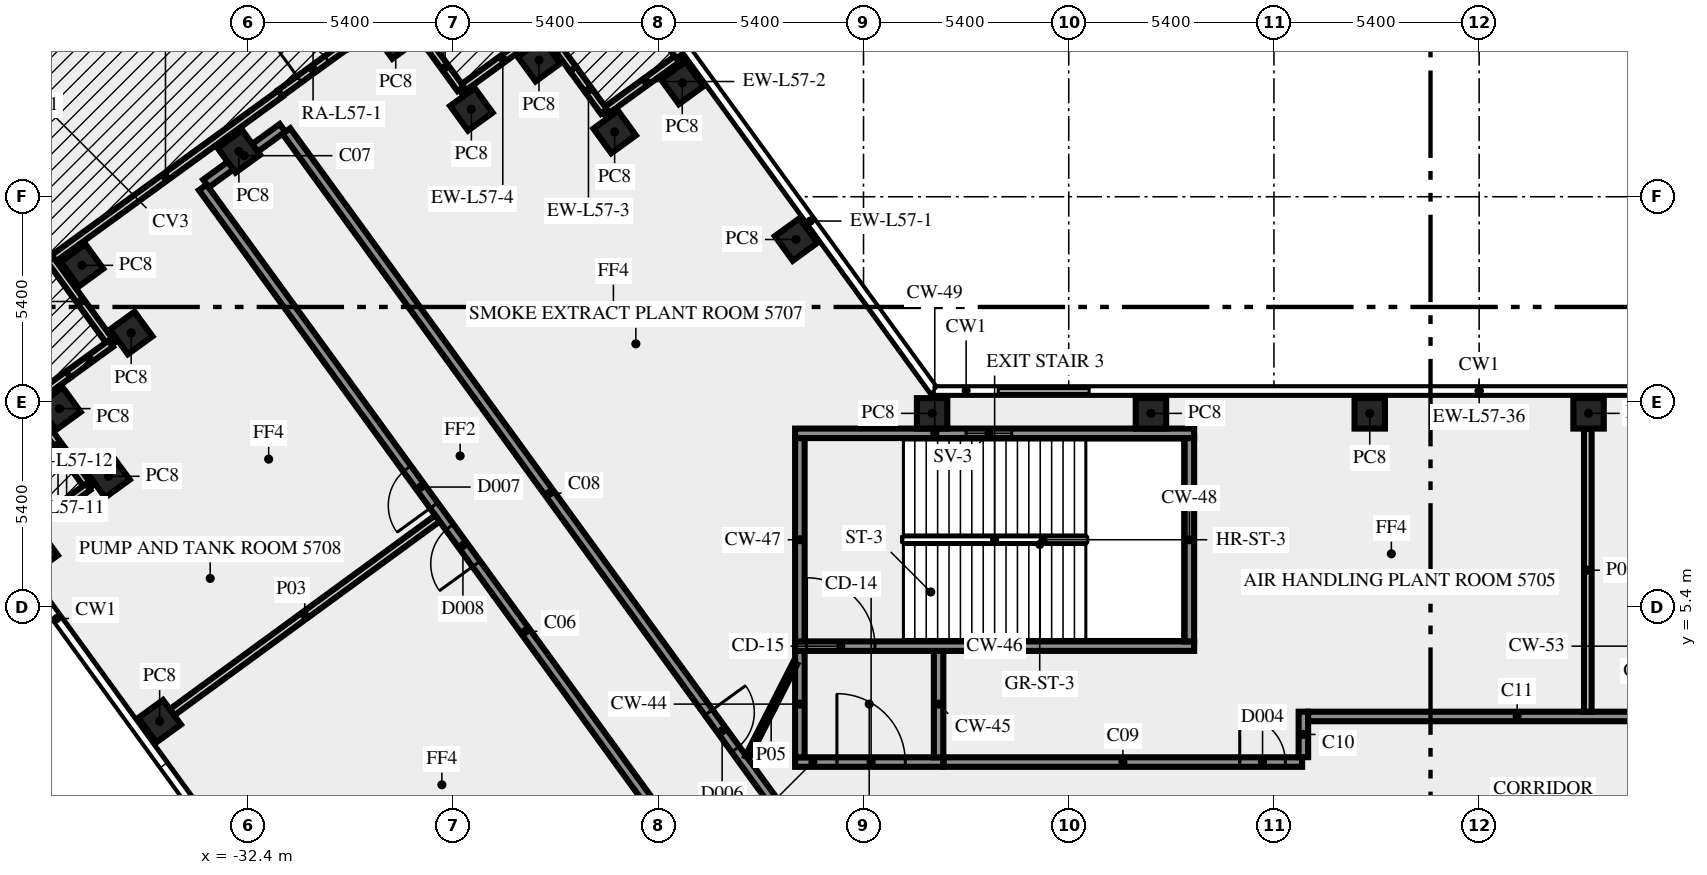
"""IFC4 building model, lengths in metres.
Left out: names, types, materials, properties, quantities, classifications, styles, units other than length and angle.
Written with IfcOpenShell. Run it as: python <this file> out.ifc"""

import sys

from ifc_helpers import new_model, si_unit, direction, frame, frame_2d, origin, origin_2d, place, context, subcontext, project, spatial, rectangle, extrude, element, fill, save


model = new_model("IFC4")
c1 = context("Model", 3, precision=1e-05, world=origin(), true_north=direction((0.0, 1.0)))
c2 = subcontext(c1, "Body", "Model", "MODEL_VIEW")
j1 = project(units=[si_unit("LENGTHUNIT", "METRE"), si_unit("PLANEANGLEUNIT", "RADIAN")], contexts=[c1])
p1 = place(None, origin())
s1 = spatial("IfcSite", under=j1, at=p1, CompositionType="ELEMENT")
p2 = place(p1, origin())
s2 = spatial("IfcBuilding", under=s1, at=p2, CompositionType="ELEMENT")
p3 = place(p2, frame((0.0, 0.0, 242.0)))
s3 = spatial("IfcBuildingStorey", under=s2, at=p3, CompositionType="ELEMENT", Elevation=242.0)
for number, where, z_axis, x_axis in (
    (1, (-17.974, 15.075, 0.0), (0.0, 0.0, 1.0), (-0.588, 0.809, 0.0)),
    (2, (-20.97, 19.195, 0.0), (0.0, 0.0, 1.0), (-0.588, 0.809, 0.0)),
    (3, (-22.749, 17.904, 0.0), (0.0, 0.0, 1.0), (-0.588, 0.809, 0.0)),
    (4, (-24.74, 19.795, 0.0), (0.0, 0.0, 1.0), (-0.588, 0.809, 0.0)),
    (5, (-26.519, 18.5, 0.0), (0.0, 0.0, 1.0), (-0.588, 0.809, 0.0)),
    (6, (-28.51, 20.39, 0.0), (0.0, 0.0, 1.0), (-0.809, -0.588, 0.0)),
    (7, (-32.637, 17.393, 0.0), (0.0, 0.0, 1.0), (-0.809, -0.588, 0.0)),
    (8, (-36.765, 14.395, 0.0), (0.0, 0.0, 1.0), (0.588, -0.809, 0.0)),
    (9, (-35.471, 12.616, 0.0), (0.0, 0.0, 1.0), (-0.809, -0.588, 0.0)),
    (10, (-37.36, 10.625, 0.0), (0.0, 0.0, 1.0), (0.588, -0.809, 0.0)),
    (11, (-36.068, 8.844, 0.0), (0.0, 0.0, 1.0), (0.588, -0.809, 0.0)),
    (12, (-37.96, 6.855, 0.0), (0.0, 0.0, 1.0), (0.588, -0.809, 0.0)),
    (13, (-34.722, 2.4, 0.0), (0.0, 0.0, 1.0), (0.588, -0.809, 0.0)),
    (14, (2.879, 10.5, 0.0), (0.0, 0.0, 1.0), (-1.0, 0.0, 0.0)),
    (15, (-2.879, 10.5, 0.0), (0.0, 0.0, 1.0), (-1.0, 0.0, 0.0)),
    (16, (-8.637, 10.5, 0.0), (0.0, 0.0, 1.0), (-1.0, 0.0, 0.0)),
    (17, (-14.395, 10.5, 0.0), (0.0, 0.0, 1.0), (-1.0, 0.0, 0.0)),
):
    element("IfcColumn", number, at=place(p3, frame(where, z_axis=z_axis, x_axis=x_axis)), inside=s3, PredefinedType="COLUMN", context=c2, shape_type="SweptSolid", body=[
        extrude(rectangle(XDim=0.8, YDim=0.8, at=origin_2d()), origin(), (0.0, 0.0, 1.0), 5.6),
    ])
p4 = place(p3, frame((-14.354, 11.093, 0.0), z_axis=(0.0, 0.0, 1.0), x_axis=(-0.58779571445, 0.809009393069, 0.0)))
e18 = element("IfcWall", 18, at=p4, inside=s3, PredefinedType="SOLIDWALL", context=c2, shape_type="SweptSolid", body=[
    extrude(rectangle(XDim=11.044, YDim=0.2, at=frame_2d((5.522, 0.0))), origin(), (0.0, 0.0, 1.0), 5.6),
])
p5 = place(p3, frame((-20.829, 20.025, 0.0), z_axis=(0.0, 0.0, 1.0), x_axis=(-0.808990163075, -0.587822180636, 0.0)))
e19 = element("IfcWall", 19, at=p5, inside=s3, PredefinedType="SOLIDWALL", context=c2, shape_type="SweptSolid", body=[
    extrude(rectangle(XDim=2.7, YDim=0.2, at=frame_2d((1.35, 0.0))), origin(), (0.0, 0.0, 1.0), 5.6),
])
p6 = place(p3, frame((-23.03, 18.441, 0.0), z_axis=(0.0, 0.0, 1.0), x_axis=(-0.587753586678, 0.809039999844, 0.0)))
e20 = element("IfcWall", 20, at=p6, inside=s3, PredefinedType="SOLIDWALL", context=c2, shape_type="SweptSolid", body=[
    extrude(rectangle(XDim=1.389, YDim=0.2, at=frame_2d((0.694, 0.0))), origin(), (0.0, 0.0, 1.0), 4.1),
])
p7 = place(p3, frame((-23.846, 19.565, 0.0), z_axis=(0.0, 0.0, 1.0), x_axis=(-0.587772972264, 0.809025916196, 0.0)))
e21 = element("IfcWall", 21, at=p7, inside=s3, PredefinedType="SOLIDWALL", context=c2, shape_type="SweptSolid", body=[
    extrude(rectangle(XDim=1.311, YDim=0.2, at=frame_2d((0.655, 0.0))), origin(), (0.0, 0.0, 1.0), 5.6),
])
p8 = place(p3, frame((-24.6, 20.623, 0.0), z_axis=(0.0, 0.0, 1.0), x_axis=(-0.809064397168, -0.587720002413, 0.0)))
e22 = element("IfcWall", 22, at=p8, inside=s3, PredefinedType="SOLIDWALL", context=c2, shape_type="SweptSolid", body=[
    extrude(rectangle(XDim=2.7, YDim=0.2, at=frame_2d((1.35, 0.0))), origin(), (0.0, 0.0, 1.0), 5.6),
])
p9 = place(p3, frame((-26.802, 19.038, 0.0), z_axis=(0.0, 0.0, 1.0), x_axis=(-0.587731903943, 0.809055751533, 0.0)))
e23 = element("IfcWall", 23, at=p9, inside=s3, PredefinedType="SOLIDWALL", context=c2, shape_type="SweptSolid", body=[
    extrude(rectangle(XDim=1.386, YDim=0.2, at=frame_2d((0.693, 0.0))), origin(), (0.0, 0.0, 1.0), 4.1),
])
p10 = place(p3, frame((-31.549, 18.926, 0.0), z_axis=(0.0, 0.0, 1.0), x_axis=(0.809022465264, 0.587777722186, 0.0)))
e24 = element("IfcWall", 24, at=p10, inside=s3, PredefinedType="SOLIDWALL", context=c2, shape_type="SweptSolid", body=[
    extrude(rectangle(XDim=2.137, YDim=0.2, at=frame_2d((1.069, 0.0))), origin(), (0.0, 0.0, 1.0), 5.6),
])
p11 = place(p10, frame((0.619, 0.0, 0.0)))
e25 = element("IfcOpeningElement", 25, at=p11, cuts=e24, PredefinedType="OPENING", context=c2, shape_type="SweptSolid", body=[
    extrude(rectangle(XDim=0.9, YDim=2.1, at=frame_2d((0.45, 1.05))), frame((0.0, 0.11, 0.0), z_axis=(0.0, -1.0, 0.0), x_axis=(1.0, 0.0, 0.0)), (0.0, 0.0, 1.0), 0.22),
])
p12 = place(p3, frame((-31.542, 18.917, 0.0), z_axis=(0.0, 0.0, 1.0), x_axis=(-0.809028102457, -0.587769963025, 0.0)))
e26 = element("IfcWall", 26, at=p12, inside=s3, PredefinedType="SOLIDWALL", context=c2, shape_type="SweptSolid", body=[
    extrude(rectangle(XDim=7.481, YDim=0.2, at=frame_2d((3.741, 0.0))), origin(), (0.0, 0.0, 1.0), 5.6),
])
p13 = place(p3, frame((-37.592, 14.536, 0.0), z_axis=(0.0, 0.0, 1.0), x_axis=(0.587762999008, -0.809033161865, 0.0)))
e27 = element("IfcWall", 27, at=p13, inside=s3, PredefinedType="SOLIDWALL", context=c2, shape_type="SweptSolid", body=[
    extrude(rectangle(XDim=2.7, YDim=0.2, at=frame_2d((1.35, 0.0))), origin(), (0.0, 0.0, 1.0), 5.6),
])
p14 = place(p3, frame((-36.007, 12.335, 0.0), z_axis=(0.0, 0.0, 1.0), x_axis=(-0.809078659976, -0.58770036751, 0.0)))
e28 = element("IfcWall", 28, at=p14, inside=s3, PredefinedType="SOLIDWALL", context=c2, shape_type="SweptSolid", body=[
    extrude(rectangle(XDim=1.386, YDim=0.2, at=frame_2d((0.693, 0.0))), origin(), (0.0, 0.0, 1.0), 4.1),
])
p15 = place(p3, frame((-37.129, 11.52, 0.0), z_axis=(0.0, 0.0, 1.0), x_axis=(-0.808985145084, -0.587829086584, 0.0)))
e29 = element("IfcWall", 29, at=p15, inside=s3, PredefinedType="SOLIDWALL", context=c2, shape_type="SweptSolid", body=[
    extrude(rectangle(XDim=1.314, YDim=0.2, at=frame_2d((0.657, 0.0))), origin(), (0.0, 0.0, 1.0), 5.6),
])
p16 = place(p3, frame((-38.189, 10.765, 0.0), z_axis=(0.0, 0.0, 1.0), x_axis=(0.587822180636, -0.808990163075, 0.0)))
e30 = element("IfcWall", 30, at=p16, inside=s3, PredefinedType="SOLIDWALL", context=c2, shape_type="SweptSolid", body=[
    extrude(rectangle(XDim=2.7, YDim=0.2, at=frame_2d((1.35, 0.0))), origin(), (0.0, 0.0, 1.0), 5.6),
])
p17 = place(p3, frame((-36.605, 8.563, 0.0), z_axis=(0.0, 0.0, 1.0), x_axis=(-0.808970345434, -0.587849453694, 0.0)))
e31 = element("IfcWall", 31, at=p17, inside=s3, PredefinedType="SOLIDWALL", context=c2, shape_type="SweptSolid", body=[
    extrude(rectangle(XDim=1.397, YDim=0.2, at=frame_2d((0.698, 0.0))), origin(), (0.0, 0.0, 1.0), 4.1),
])
p18 = place(p3, frame((-38.786, 6.993, 0.0), z_axis=(0.0, 0.0, 1.0), x_axis=(0.587789790223, -0.809013697356, 0.0)))
e32 = element("IfcWall", 32, at=p18, inside=s3, PredefinedType="SOLIDWALL", context=c2, shape_type="SweptSolid", body=[
    extrude(rectangle(XDim=16.956, YDim=0.2, at=frame_2d((8.478, 0.0))), origin(), (0.0, 0.0, 1.0), 5.6),
])
p19 = place(p3, frame((14.344, 11.088, 0.0), z_axis=(0.0, 0.0, 1.0), x_axis=(-1.0, 0.0, 0.0)))
e33 = element("IfcWall", 33, at=p19, inside=s3, PredefinedType="SOLIDWALL", context=c2, shape_type="SweptSolid", body=[
    extrude(rectangle(XDim=28.688, YDim=0.2, at=frame_2d((14.344, 0.0))), origin(), (0.0, 0.0, 1.0), 5.6),
])
p20 = place(p3, frame((-27.939, 29.429, 0.0), z_axis=(0.0, 0.0, 1.0), x_axis=(0.587780660559, -0.809020330444, 0.0)))
e34 = element("IfcWall", 34, at=p20, inside=s3, PredefinedType="PARAPET", context=c2, shape_type="SweptSolid", body=[
    extrude(rectangle(XDim=11.77, YDim=0.25, at=frame_2d((5.885, 0.0))), origin(), (0.0, 0.0, 1.0), 1.1),
])
p21 = place(p3, frame((-18.0, 1.325, 0.0), z_axis=(0.0, 0.0, 1.0), x_axis=(1.0, 0.0, 0.0)))
e35 = element("IfcWall", 35, at=p21, inside=s3, PredefinedType="SHEAR", context=c2, shape_type="SweptSolid", body=[
    extrude(rectangle(XDim=3.9, YDim=0.25, at=frame_2d((1.95, 0.0))), origin(), (0.0, 0.0, 1.0), 5.6),
])
p22 = place(p21, frame((1.1, 0.0, 0.0)))
e36 = element("IfcOpeningElement", 36, at=p22, cuts=e35, PredefinedType="OPENING", context=c2, shape_type="SweptSolid", body=[
    extrude(rectangle(XDim=1.8, YDim=2.1, at=frame_2d((0.9, 1.05))), frame((0.0, 0.135, 0.0), z_axis=(0.0, -1.0, 0.0), x_axis=(1.0, 0.0, 0.0)), (0.0, 0.0, 1.0), 0.27),
])
for number, where, z_axis, x_axis in (
    (37, (-17.875, 1.45, 0.0), (0.0, 0.0, 1.0), (0.0, 1.0, 0.0)),
    (38, (-14.225, 1.45, 0.0), (0.0, 0.0, 1.0), (0.0, 1.0, 0.0)),
):
    element("IfcWall", number, at=place(p3, frame(where, z_axis=z_axis, x_axis=x_axis)), inside=s3, PredefinedType="SHEAR", context=c2, shape_type="SweptSolid", body=[
        extrude(rectangle(XDim=2.8, YDim=0.25, at=frame_2d((1.4, 0.0))), origin(), (0.0, 0.0, 1.0), 5.6),
    ])
p23 = place(p3, frame((-18.0, 4.375, 0.0), z_axis=(0.0, 0.0, 1.0), x_axis=(1.0, 0.0, 0.0)))
e39 = element("IfcWall", 39, at=p23, inside=s3, PredefinedType="SHEAR", context=c2, shape_type="SweptSolid", body=[
    extrude(rectangle(XDim=10.5, YDim=0.25, at=frame_2d((5.25, 0.0))), origin(), (0.0, 0.0, 1.0), 5.6),
])
p24 = place(p23, frame((0.3, 0.0, 0.0)))
e40 = element("IfcOpeningElement", 40, at=p24, cuts=e39, PredefinedType="OPENING", context=c2, shape_type="SweptSolid", body=[
    extrude(rectangle(XDim=1.8, YDim=2.1, at=frame_2d((0.9, 1.05))), frame((0.0, 0.135, 0.0), z_axis=(0.0, -1.0, 0.0), x_axis=(1.0, 0.0, 0.0)), (0.0, 0.0, 1.0), 0.27),
])
for number, where, z_axis, x_axis in (
    (41, (-17.875, 4.5, 0.0), (0.0, 0.0, 1.0), (0.0, 1.0, 0.0)),
    (42, (-7.625, 4.5, 0.0), (0.0, 0.0, 1.0), (0.0, 1.0, 0.0)),
):
    element("IfcWall", number, at=place(p3, frame(where, z_axis=z_axis, x_axis=x_axis)), inside=s3, PredefinedType="SHEAR", context=c2, shape_type="SweptSolid", body=[
        extrude(rectangle(XDim=5.35, YDim=0.25, at=frame_2d((2.675, 0.0))), origin(), (0.0, 0.0, 1.0), 5.6),
    ])
p25 = place(p3, frame((-18.0, 9.975, 0.0), z_axis=(0.0, 0.0, 1.0), x_axis=(1.0, 0.0, 0.0)))
e43 = element("IfcWall", 43, at=p25, inside=s3, PredefinedType="SHEAR", context=c2, shape_type="SweptSolid", body=[
    extrude(rectangle(XDim=10.5, YDim=0.25, at=frame_2d((5.25, 0.0))), origin(), (0.0, 0.0, 1.0), 5.6),
])
p26 = place(p25, frame((4.5, 0.0, 1.0)))
e44 = element("IfcOpeningElement", 44, at=p26, cuts=e43, PredefinedType="OPENING", context=c2, shape_type="SweptSolid", body=[
    extrude(rectangle(XDim=1.2, YDim=1.2, at=frame_2d((0.6, 0.6))), frame((0.0, 0.135, 0.0), z_axis=(0.0, -1.0, 0.0), x_axis=(1.0, 0.0, 0.0)), (0.0, 0.0, 1.0), 0.27),
])
p27 = place(p3, frame((-20.531, -1.523, 0.0), z_axis=(0.0, 0.0, 1.0), x_axis=(-0.587782114023, 0.809019274452, 0.0)))
e45 = element("IfcWall", 45, at=p27, inside=s3, PredefinedType="SOLIDWALL", context=c2, shape_type="SweptSolid", body=[
    extrude(rectangle(XDim=22.212, YDim=0.25, at=frame_2d((11.106, 0.0))), origin(), (0.0, 0.0, 1.0), 5.6),
])
p28 = place(p27, frame((11.865, 0.0, 0.0)))
e46 = element("IfcOpeningElement", 46, at=p28, cuts=e45, PredefinedType="OPENING", context=c2, shape_type="SweptSolid", body=[
    extrude(rectangle(XDim=1.2, YDim=2.1, at=frame_2d((0.6, 1.05))), frame((0.0, 0.135, 0.0), z_axis=(0.0, -1.0, 0.0), x_axis=(1.0, 0.0, 0.0)), (0.0, 0.0, 1.0), 0.27),
])
p29 = place(p27, frame((9.966, 0.0, 0.0)))
e47 = element("IfcOpeningElement", 47, at=p29, cuts=e45, PredefinedType="OPENING", context=c2, shape_type="SweptSolid", body=[
    extrude(rectangle(XDim=1.2, YDim=2.1, at=frame_2d((0.6, 1.05))), frame((0.0, 0.135, 0.0), z_axis=(0.0, -1.0, 0.0), x_axis=(1.0, 0.0, 0.0)), (0.0, 0.0, 1.0), 0.27),
])
p30 = place(p3, frame((-33.502, 16.549, 0.0), z_axis=(0.0, 0.0, 1.0), x_axis=(0.809045768422, 0.587745646176, 0.0)))
e48 = element("IfcWall", 48, at=p30, inside=s3, PredefinedType="SOLIDWALL", context=c2, shape_type="SweptSolid", body=[
    extrude(rectangle(XDim=2.488, YDim=0.25, at=frame_2d((1.244, 0.0))), origin(), (0.0, 0.0, 1.0), 5.6),
])
p31 = place(p3, frame((-31.387, 17.927, 0.0), z_axis=(0.0, 0.0, 1.0), x_axis=(0.587788830132, -0.80901439491, 0.0)))
e49 = element("IfcWall", 49, at=p31, inside=s3, PredefinedType="SOLIDWALL", context=c2, shape_type="SweptSolid", body=[
    extrude(rectangle(XDim=23.549, YDim=0.25, at=frame_2d((11.775, 0.0))), origin(), (0.0, 0.0, 1.0), 5.6),
])
p32 = place(p31, frame((18.907, 0.0, 0.0)))
e50 = element("IfcOpeningElement", 50, at=p32, cuts=e49, PredefinedType="OPENING", context=c2, shape_type="SweptSolid", body=[
    extrude(rectangle(XDim=1.2, YDim=2.1, at=frame_2d((0.6, 1.05))), frame((0.0, 0.135, 0.0), z_axis=(0.0, -1.0, 0.0), x_axis=(1.0, 0.0, 0.0)), (0.0, 0.0, 1.0), 0.27),
])
p33 = place(p3, frame((-14.09, 1.325, 0.0), z_axis=(0.0, 0.0, 1.0), x_axis=(1.0, 0.0, 0.0)))
e51 = element("IfcWall", 51, at=p33, inside=s3, PredefinedType="SOLIDWALL", context=c2, shape_type="SweptSolid", body=[
    extrude(rectangle(XDim=9.431, YDim=0.25, at=frame_2d((4.716, 0.0))), origin(), (0.0, 0.0, 1.0), 5.6),
])
p34 = place(p33, frame((7.79, 0.0, 0.0)))
e52 = element("IfcOpeningElement", 52, at=p34, cuts=e51, PredefinedType="OPENING", context=c2, shape_type="SweptSolid", body=[
    extrude(rectangle(XDim=1.2, YDim=2.1, at=frame_2d((0.6, 1.05))), frame((0.0, 0.135, 0.0), z_axis=(0.0, -1.0, 0.0), x_axis=(1.0, 0.0, 0.0)), (0.0, 0.0, 1.0), 0.27),
])
p35 = place(p3, frame((-4.625, 1.454, 0.0), z_axis=(0.0, 0.0, 1.0), x_axis=(0.0, 1.0, 0.0)))
e53 = element("IfcWall", 53, at=p35, inside=s3, PredefinedType="SOLIDWALL", context=c2, shape_type="SweptSolid", body=[
    extrude(rectangle(XDim=1.196, YDim=0.25, at=frame_2d((0.598, 0.0))), origin(), (0.0, 0.0, 1.0), 5.6),
])
p36 = place(p3, frame((-4.5, 2.525, 0.0), z_axis=(0.0, 0.0, 1.0), x_axis=(1.0, 0.0, 0.0)))
e54 = element("IfcWall", 54, at=p36, inside=s3, PredefinedType="SOLIDWALL", context=c2, shape_type="SweptSolid", body=[
    extrude(rectangle(XDim=11.0, YDim=0.25, at=frame_2d((5.5, 0.0))), origin(), (0.0, 0.0, 1.0), 5.6),
])
p37 = place(p3, frame((2.859, 2.65, 0.0), z_axis=(0.0, 0.0, 1.0), x_axis=(0.0, 1.0, 0.0)))
e55 = element("IfcWall", 55, at=p37, inside=s3, PredefinedType="SOLIDWALL", context=c2, shape_type="SweptSolid", body=[
    extrude(rectangle(XDim=7.445, YDim=0.2, at=frame_2d((3.723, 0.0))), origin(), (0.0, 0.0, 1.0), 5.6),
])
p38 = place(p3, frame((-34.394, 2.637, 0.0), z_axis=(0.0, 0.0, 1.0), x_axis=(0.807574266555, 0.589765889145, 0.0)))
e56 = element("IfcWall", 56, at=p38, inside=s3, PredefinedType="SOLIDWALL", context=c2, shape_type="SweptSolid", body=[
    extrude(rectangle(XDim=8.644, YDim=0.2, at=frame_2d((4.322, 0.0))), origin(), (0.0, 0.0, 1.0), 5.6),
])
p39 = place(p3, frame((-19.261, 1.45, 0.0), z_axis=(0.0, 0.0, 1.0), x_axis=(0.453950796792, 0.891026752736, 0.0)))
e57 = element("IfcWall", 57, at=p39, inside=s3, PredefinedType="PARTITIONING", context=c2, shape_type="SweptSolid", body=[
    extrude(rectangle(XDim=2.778, YDim=0.12, at=frame_2d((1.389, 0.0))), origin(), (0.0, 0.0, 1.0), 5.6),
])
p40 = place(p11, origin())
e58 = element("IfcDoor", 58, at=p40, inside=s3, OperationType="SINGLE_SWING_RIGHT", PredefinedType="DOOR", context=c2, shape_type="SweptSolid", body=[
    extrude(rectangle(XDim=0.9, YDim=2.1, at=frame_2d((0.45, 1.05))), frame((0.0, 0.025, 0.0), z_axis=(0.0, -1.0, 0.0), x_axis=(1.0, 0.0, 0.0)), (0.0, 0.0, 1.0), 0.05),
])
fill(e25, e58)
p41 = place(p22, origin())
e59 = element("IfcDoor", 59, at=p41, inside=s3, OperationType="DOUBLE_DOOR_SINGLE_SWING", PredefinedType="DOOR", context=c2, shape_type="SweptSolid", body=[
    extrude(rectangle(XDim=1.8, YDim=2.1, at=frame_2d((0.9, 1.05))), frame((0.0, 0.025, 0.0), z_axis=(0.0, -1.0, 0.0), x_axis=(1.0, 0.0, 0.0)), (0.0, 0.0, 1.0), 0.05),
])
fill(e36, e59)
p42 = place(p24, origin())
e60 = element("IfcDoor", 60, at=p42, inside=s3, OperationType="DOUBLE_DOOR_SINGLE_SWING", PredefinedType="DOOR", context=c2, shape_type="SweptSolid", body=[
    extrude(rectangle(XDim=1.8, YDim=2.1, at=frame_2d((0.9, 1.05))), frame((0.0, 0.025, 0.0), z_axis=(0.0, -1.0, 0.0), x_axis=(1.0, 0.0, 0.0)), (0.0, 0.0, 1.0), 0.05),
])
fill(e40, e60)
p43 = place(p26, origin())
e61 = element("IfcWindow", 61, at=p43, inside=s3, PartitioningType="SINGLE_PANEL", PredefinedType="WINDOW", context=c2, shape_type="SweptSolid", body=[
    extrude(rectangle(XDim=1.2, YDim=1.2, at=frame_2d((0.6, 0.6))), frame((0.0, 0.03, 0.0), z_axis=(0.0, -1.0, 0.0), x_axis=(1.0, 0.0, 0.0)), (0.0, 0.0, 1.0), 0.06),
])
fill(e44, e61)
p44 = place(p34, origin())
e62 = element("IfcDoor", 62, at=p44, inside=s3, OperationType="SINGLE_SWING_RIGHT", PredefinedType="DOOR", context=c2, shape_type="SweptSolid", body=[
    extrude(rectangle(XDim=1.2, YDim=2.1, at=frame_2d((0.6, 1.05))), frame((0.0, 0.025, 0.0), z_axis=(0.0, -1.0, 0.0), x_axis=(1.0, 0.0, 0.0)), (0.0, 0.0, 1.0), 0.05),
])
fill(e52, e62)
p45 = place(p32, origin())
e63 = element("IfcDoor", 63, at=p45, inside=s3, OperationType="SINGLE_SWING_RIGHT", PredefinedType="DOOR", context=c2, shape_type="SweptSolid", body=[
    extrude(rectangle(XDim=1.2, YDim=2.1, at=frame_2d((0.6, 1.05))), frame((0.0, 0.025, 0.0), z_axis=(0.0, -1.0, 0.0), x_axis=(1.0, 0.0, 0.0)), (0.0, 0.0, 1.0), 0.05),
])
fill(e50, e63)
p46 = place(p28, origin())
e64 = element("IfcDoor", 64, at=p46, inside=s3, OperationType="SINGLE_SWING_LEFT", PredefinedType="DOOR", context=c2, shape_type="SweptSolid", body=[
    extrude(rectangle(XDim=1.2, YDim=2.1, at=frame_2d((0.6, 1.05))), frame((0.0, 0.025, 0.0), z_axis=(0.0, -1.0, 0.0), x_axis=(1.0, 0.0, 0.0)), (0.0, 0.0, 1.0), 0.05),
])
fill(e46, e64)
p47 = place(p29, origin())
e65 = element("IfcDoor", 65, at=p47, inside=s3, OperationType="SINGLE_SWING_RIGHT", PredefinedType="DOOR", context=c2, shape_type="SweptSolid", body=[
    extrude(rectangle(XDim=1.2, YDim=2.1, at=frame_2d((0.6, 1.05))), frame((0.0, 0.025, 0.0), z_axis=(0.0, -1.0, 0.0), x_axis=(1.0, 0.0, 0.0)), (0.0, 0.0, 1.0), 0.05),
])
fill(e47, e65)
save(model, sys.argv[1])
